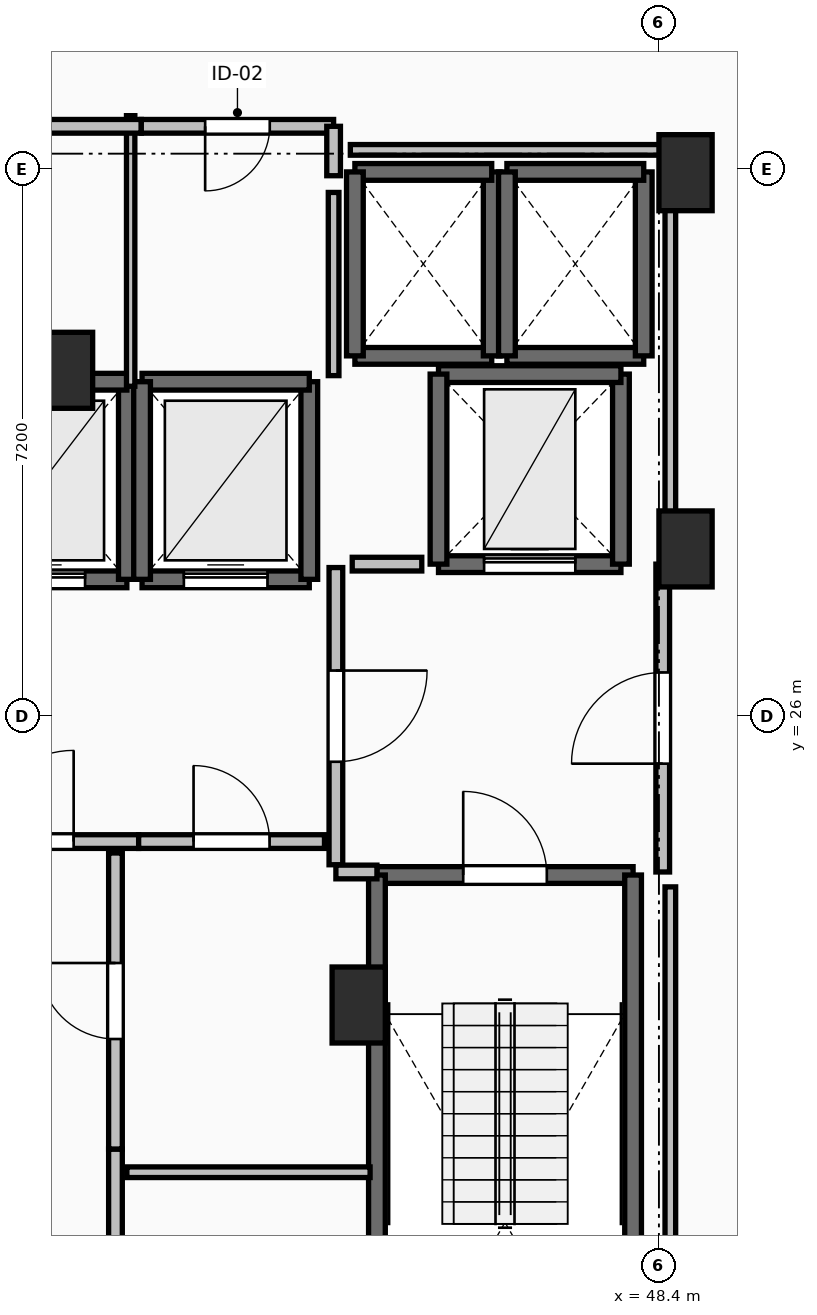
"""IFC4 building model, lengths in metres.
Left out: names, types, materials, properties, quantities, classifications, styles, units other than length and angle.
Written with IfcOpenShell. Run it as: python <this file> out.ifc"""

import sys

from ifc_helpers import new_model, si_unit, direction, frame, frame_2d, origin, origin_2d, place, context, subcontext, project, spatial, rectangle, extrude, element, fill, save


model = new_model("IFC4")
c1 = context("Model", 3, precision=1e-05, world=origin(), true_north=direction((0.0, 1.0)))
c2 = subcontext(c1, "Body", "Model", "MODEL_VIEW")
j1 = project(units=[si_unit("LENGTHUNIT", "METRE"), si_unit("PLANEANGLEUNIT", "RADIAN")], contexts=[c1])
p1 = place(None, origin())
s1 = spatial("IfcSite", under=j1, at=p1, CompositionType="ELEMENT")
p2 = place(p1, origin())
s2 = spatial("IfcBuilding", under=s1, at=p2, CompositionType="ELEMENT")
p3 = place(p2, frame((0.0, 0.0, 273.3)))
s3 = spatial("IfcBuildingStorey", under=s2, at=p3, CompositionType="ELEMENT", Elevation=273.3)
for number, where, z_axis, x_axis in (
    (1, (48.75, 33.15, 0.0), (0.0, 0.0, 1.0), (1.0, 0.0, 0.0)),
    (2, (48.75, 28.2, 0.0), (0.0, 0.0, 1.0), (1.0, 0.0, 0.0)),
    (3, (44.45, 22.2, 0.0), (0.0, 0.0, 1.0), (1.0, 0.0, 0.0)),
    (4, (40.6, 30.55, 0.0), (0.0, 0.0, 1.0), (1.0, 0.0, 0.0)),
):
    element("IfcColumn", number, at=place(p3, frame(where, z_axis=z_axis, x_axis=x_axis)), inside=s3, PredefinedType="PILASTER", context=c2, shape_type="SweptSolid", body=[
        extrude(rectangle(XDim=0.7, YDim=1.0, at=origin_2d()), origin(), (0.0, 0.0, 1.0), 3.55),
    ])
p4 = place(p3, frame((44.69, 23.91, 0.0), z_axis=(0.0, 0.0, 1.0), x_axis=(1.0, 0.0, 0.0)))
e5 = element("IfcWall", 5, at=p4, inside=s3, PredefinedType="SOLIDWALL", context=c2, shape_type="SweptSolid", body=[
    extrude(rectangle(XDim=3.37, YDim=0.22, at=frame_2d((1.685, 0.0))), origin(), (0.0, 0.0, 1.0), 3.29),
])
p5 = place(p4, frame((1.135, 0.0, 0.0)))
e6 = element("IfcOpeningElement", 6, at=p5, cuts=e5, PredefinedType="OPENING", context=c2, shape_type="SweptSolid", body=[
    extrude(rectangle(XDim=1.1, YDim=2.15, at=frame_2d((0.55, 1.075))), frame((0.0, 0.125, 0.0), z_axis=(0.0, -1.0, 0.0), x_axis=(1.0, 0.0, 0.0)), (0.0, 0.0, 1.0), 0.25),
])
for number, where, z_axis, x_axis in (
    (7, (48.06, 23.91, 0.0), (0.0, 0.0, 1.0), (0.0, -1.0, 0.0)),
    (8, (44.69, 16.49, 0.0), (0.0, 0.0, 1.0), (0.0, 1.0, 0.0)),
):
    element("IfcWall", number, at=place(p3, frame(where, z_axis=z_axis, x_axis=x_axis)), inside=s3, PredefinedType="SOLIDWALL", context=c2, shape_type="SweptSolid", body=[
        extrude(rectangle(XDim=7.42, YDim=0.22, at=frame_2d((3.71, 0.0))), origin(), (0.0, 0.0, 1.0), 3.29),
    ])
p6 = place(p3, frame((39.2, 27.8, 0.0), z_axis=(0.0, 0.0, 1.0), x_axis=(1.0, 0.0, 0.0)))
e9 = element("IfcWall", 9, at=p6, inside=s3, PredefinedType="SOLIDWALL", context=c2, shape_type="SweptSolid", body=[
    extrude(rectangle(XDim=2.2, YDim=0.22, at=frame_2d((1.1, 0.0))), origin(), (0.0, 0.0, 1.0), 3.29),
])
p7 = place(p6, frame((0.55, 0.0, 0.0)))
e10 = element("IfcOpeningElement", 10, at=p7, cuts=e9, PredefinedType="OPENING", context=c2, shape_type="SweptSolid", body=[
    extrude(rectangle(XDim=1.1, YDim=2.2, at=frame_2d((0.55, 1.1))), frame((0.0, 0.125, 0.0), z_axis=(0.0, -1.0, 0.0), x_axis=(1.0, 0.0, 0.0)), (0.0, 0.0, 1.0), 0.25),
])
p8 = place(p3, frame((41.4, 27.8, 0.0), z_axis=(0.0, 0.0, 1.0), x_axis=(0.0, 1.0, 0.0)))
e11 = element("IfcWall", 11, at=p8, inside=s3, PredefinedType="SOLIDWALL", context=c2, shape_type="SweptSolid", body=[
    extrude(rectangle(XDim=2.6, YDim=0.22, at=frame_2d((1.3, 0.0))), origin(), (0.0, 0.0, 1.0), 3.29),
])
p9 = place(p3, frame((41.4, 30.4, 0.0), z_axis=(0.0, 0.0, 1.0), x_axis=(-1.0, 0.0, 0.0)))
e12 = element("IfcWall", 12, at=p9, inside=s3, PredefinedType="SOLIDWALL", context=c2, shape_type="SweptSolid", body=[
    extrude(rectangle(XDim=2.2, YDim=0.22, at=frame_2d((1.1, 0.0))), origin(), (0.0, 0.0, 1.0), 3.29),
])
p10 = place(p3, frame((41.6, 27.8, 0.0), z_axis=(0.0, 0.0, 1.0), x_axis=(1.0, 0.0, 0.0)))
e13 = element("IfcWall", 13, at=p10, inside=s3, PredefinedType="SOLIDWALL", context=c2, shape_type="SweptSolid", body=[
    extrude(rectangle(XDim=2.2, YDim=0.22, at=frame_2d((1.1, 0.0))), origin(), (0.0, 0.0, 1.0), 3.29),
])
p11 = place(p10, frame((0.55, 0.0, 0.0)))
e14 = element("IfcOpeningElement", 14, at=p11, cuts=e13, PredefinedType="OPENING", context=c2, shape_type="SweptSolid", body=[
    extrude(rectangle(XDim=1.1, YDim=2.2, at=frame_2d((0.55, 1.1))), frame((0.0, 0.125, 0.0), z_axis=(0.0, -1.0, 0.0), x_axis=(1.0, 0.0, 0.0)), (0.0, 0.0, 1.0), 0.25),
])
p12 = place(p3, frame((43.8, 27.8, 0.0), z_axis=(0.0, 0.0, 1.0), x_axis=(0.0, 1.0, 0.0)))
e15 = element("IfcWall", 15, at=p12, inside=s3, PredefinedType="SOLIDWALL", context=c2, shape_type="SweptSolid", body=[
    extrude(rectangle(XDim=2.6, YDim=0.22, at=frame_2d((1.3, 0.0))), origin(), (0.0, 0.0, 1.0), 3.29),
])
p13 = place(p3, frame((43.8, 30.4, 0.0), z_axis=(0.0, 0.0, 1.0), x_axis=(-1.0, 0.0, 0.0)))
e16 = element("IfcWall", 16, at=p13, inside=s3, PredefinedType="SOLIDWALL", context=c2, shape_type="SweptSolid", body=[
    extrude(rectangle(XDim=2.2, YDim=0.22, at=frame_2d((1.1, 0.0))), origin(), (0.0, 0.0, 1.0), 3.29),
])
p14 = place(p3, frame((41.6, 30.4, 0.0), z_axis=(0.0, 0.0, 1.0), x_axis=(0.0, -1.0, 0.0)))
e17 = element("IfcWall", 17, at=p14, inside=s3, PredefinedType="SOLIDWALL", context=c2, shape_type="SweptSolid", body=[
    extrude(rectangle(XDim=2.6, YDim=0.22, at=frame_2d((1.3, 0.0))), origin(), (0.0, 0.0, 1.0), 3.29),
])
p15 = place(p3, frame((44.4, 30.74, 0.0), z_axis=(0.0, 0.0, 1.0), x_axis=(1.0, 0.0, 0.0)))
e18 = element("IfcWall", 18, at=p15, inside=s3, PredefinedType="SOLIDWALL", context=c2, shape_type="SweptSolid", body=[
    extrude(rectangle(XDim=1.8, YDim=0.22, at=frame_2d((0.9, 0.0))), origin(), (0.0, 0.0, 1.0), 3.29),
])
p16 = place(p3, frame((46.2, 30.74, 0.0), z_axis=(0.0, 0.0, 1.0), x_axis=(0.0, 1.0, 0.0)))
e19 = element("IfcWall", 19, at=p16, inside=s3, PredefinedType="SOLIDWALL", context=c2, shape_type="SweptSolid", body=[
    extrude(rectangle(XDim=2.42, YDim=0.22, at=frame_2d((1.21, 0.0))), origin(), (0.0, 0.0, 1.0), 3.29),
])
p17 = place(p3, frame((46.2, 33.16, 0.0), z_axis=(0.0, 0.0, 1.0), x_axis=(-1.0, 0.0, 0.0)))
e20 = element("IfcWall", 20, at=p17, inside=s3, PredefinedType="SOLIDWALL", context=c2, shape_type="SweptSolid", body=[
    extrude(rectangle(XDim=1.8, YDim=0.22, at=frame_2d((0.9, 0.0))), origin(), (0.0, 0.0, 1.0), 3.29),
])
p18 = place(p3, frame((44.4, 33.16, 0.0), z_axis=(0.0, 0.0, 1.0), x_axis=(0.0, -1.0, 0.0)))
e21 = element("IfcWall", 21, at=p18, inside=s3, PredefinedType="SOLIDWALL", context=c2, shape_type="SweptSolid", body=[
    extrude(rectangle(XDim=2.42, YDim=0.22, at=frame_2d((1.21, 0.0))), origin(), (0.0, 0.0, 1.0), 3.29),
])
p19 = place(p3, frame((46.4, 30.74, 0.0), z_axis=(0.0, 0.0, 1.0), x_axis=(1.0, 0.0, 0.0)))
e22 = element("IfcWall", 22, at=p19, inside=s3, PredefinedType="SOLIDWALL", context=c2, shape_type="SweptSolid", body=[
    extrude(rectangle(XDim=1.8, YDim=0.22, at=frame_2d((0.9, 0.0))), origin(), (0.0, 0.0, 1.0), 3.29),
])
p20 = place(p3, frame((48.2, 30.74, 0.0), z_axis=(0.0, 0.0, 1.0), x_axis=(0.0, 1.0, 0.0)))
e23 = element("IfcWall", 23, at=p20, inside=s3, PredefinedType="SOLIDWALL", context=c2, shape_type="SweptSolid", body=[
    extrude(rectangle(XDim=2.42, YDim=0.22, at=frame_2d((1.21, 0.0))), origin(), (0.0, 0.0, 1.0), 3.29),
])
p21 = place(p3, frame((48.2, 33.16, 0.0), z_axis=(0.0, 0.0, 1.0), x_axis=(-1.0, 0.0, 0.0)))
e24 = element("IfcWall", 24, at=p21, inside=s3, PredefinedType="SOLIDWALL", context=c2, shape_type="SweptSolid", body=[
    extrude(rectangle(XDim=1.8, YDim=0.22, at=frame_2d((0.9, 0.0))), origin(), (0.0, 0.0, 1.0), 3.29),
])
p22 = place(p3, frame((46.4, 33.16, 0.0), z_axis=(0.0, 0.0, 1.0), x_axis=(0.0, -1.0, 0.0)))
e25 = element("IfcWall", 25, at=p22, inside=s3, PredefinedType="SOLIDWALL", context=c2, shape_type="SweptSolid", body=[
    extrude(rectangle(XDim=2.42, YDim=0.22, at=frame_2d((1.21, 0.0))), origin(), (0.0, 0.0, 1.0), 3.29),
])
p23 = place(p3, frame((45.5, 28.0, 0.0), z_axis=(0.0, 0.0, 1.0), x_axis=(1.0, 0.0, 0.0)))
e26 = element("IfcWall", 26, at=p23, inside=s3, PredefinedType="SHEAR", context=c2, shape_type="SweptSolid", body=[
    extrude(rectangle(XDim=2.4, YDim=0.22, at=frame_2d((1.2, 0.0))), origin(), (0.0, 0.0, 1.0), 3.29),
])
p24 = place(p23, frame((0.6, 0.0, 0.0)))
e27 = element("IfcOpeningElement", 27, at=p24, cuts=e26, PredefinedType="OPENING", context=c2, shape_type="SweptSolid", body=[
    extrude(rectangle(XDim=1.2, YDim=2.2, at=frame_2d((0.6, 1.1))), frame((0.0, 0.125, 0.0), z_axis=(0.0, -1.0, 0.0), x_axis=(1.0, 0.0, 0.0)), (0.0, 0.0, 1.0), 0.25),
])
p25 = place(p3, frame((47.9, 28.0, 0.0), z_axis=(0.0, 0.0, 1.0), x_axis=(0.0, 1.0, 0.0)))
e28 = element("IfcWall", 28, at=p25, inside=s3, PredefinedType="SHEAR", context=c2, shape_type="SweptSolid", body=[
    extrude(rectangle(XDim=2.5, YDim=0.22, at=frame_2d((1.25, 0.0))), origin(), (0.0, 0.0, 1.0), 3.29),
])
p26 = place(p3, frame((47.9, 30.5, 0.0), z_axis=(0.0, 0.0, 1.0), x_axis=(-1.0, 0.0, 0.0)))
e29 = element("IfcWall", 29, at=p26, inside=s3, PredefinedType="SHEAR", context=c2, shape_type="SweptSolid", body=[
    extrude(rectangle(XDim=2.4, YDim=0.22, at=frame_2d((1.2, 0.0))), origin(), (0.0, 0.0, 1.0), 3.29),
])
p27 = place(p3, frame((45.5, 30.5, 0.0), z_axis=(0.0, 0.0, 1.0), x_axis=(0.0, -1.0, 0.0)))
e30 = element("IfcWall", 30, at=p27, inside=s3, PredefinedType="SHEAR", context=c2, shape_type="SweptSolid", body=[
    extrude(rectangle(XDim=2.5, YDim=0.22, at=frame_2d((1.25, 0.0))), origin(), (0.0, 0.0, 1.0), 3.29),
])
p28 = place(p3, frame((44.15, 27.955, 0.0), z_axis=(0.0, 0.0, 1.0), x_axis=(0.0, -1.0, 0.0)))
e31 = element("IfcWall", 31, at=p28, inside=s3, PredefinedType="PARTITIONING", context=c2, shape_type="SweptSolid", body=[
    extrude(rectangle(XDim=3.91, YDim=0.18, at=frame_2d((1.955, 0.0))), origin(), (0.0, 0.0, 1.0), 3.29),
])
p29 = place(p28, frame((1.355, 0.0, 0.0)))
e32 = element("IfcOpeningElement", 32, at=p29, cuts=e31, PredefinedType="OPENING", context=c2, shape_type="SweptSolid", body=[
    extrude(rectangle(XDim=1.2, YDim=2.15, at=frame_2d((0.6, 1.075))), frame((0.0, 0.105, 0.0), z_axis=(0.0, -1.0, 0.0), x_axis=(1.0, 0.0, 0.0)), (0.0, 0.0, 1.0), 0.21),
])
p30 = place(p3, frame((44.15, 23.95, 0.0), z_axis=(0.0, 0.0, 1.0), x_axis=(1.0, 0.0, 0.0)))
e33 = element("IfcWall", 33, at=p30, inside=s3, PredefinedType="PARTITIONING", context=c2, shape_type="SweptSolid", body=[
    extrude(rectangle(XDim=0.54, YDim=0.18, at=frame_2d((0.27, 0.0))), origin(), (0.0, 0.0, 1.0), 3.29),
])
p31 = place(p3, frame((48.45, 23.95, 0.0), z_axis=(0.0, 0.0, 1.0), x_axis=(0.0, 1.0, 0.0)))
e34 = element("IfcWall", 34, at=p31, inside=s3, PredefinedType="PARTITIONING", context=c2, shape_type="SweptSolid", body=[
    extrude(rectangle(XDim=4.05, YDim=0.18, at=frame_2d((2.025, 0.0))), origin(), (0.0, 0.0, 1.0), 3.29),
])
p32 = place(p31, frame((1.425, 0.0, 0.0)))
e35 = element("IfcOpeningElement", 35, at=p32, cuts=e34, PredefinedType="OPENING", context=c2, shape_type="SweptSolid", body=[
    extrude(rectangle(XDim=1.2, YDim=2.15, at=frame_2d((0.6, 1.075))), frame((0.0, 0.105, 0.0), z_axis=(0.0, -1.0, 0.0), x_axis=(1.0, 0.0, 0.0)), (0.0, 0.0, 1.0), 0.21),
])
p33 = place(p3, frame((38.645, 24.35, 0.0), z_axis=(0.0, 0.0, 1.0), x_axis=(1.0, 0.0, 0.0)))
e36 = element("IfcWall", 36, at=p33, inside=s3, PredefinedType="PARTITIONING", context=c2, shape_type="SweptSolid", body=[
    extrude(rectangle(XDim=2.91, YDim=0.18, at=frame_2d((1.455, 0.0))), origin(), (0.0, 0.0, 1.0), 3.29),
])
p34 = place(p33, frame((0.855, 0.0, 0.0)))
e37 = element("IfcOpeningElement", 37, at=p34, cuts=e36, PredefinedType="OPENING", context=c2, shape_type="SweptSolid", body=[
    extrude(rectangle(XDim=1.2, YDim=2.15, at=frame_2d((0.6, 1.075))), frame((0.0, 0.105, 0.0), z_axis=(0.0, -1.0, 0.0), x_axis=(1.0, 0.0, 0.0)), (0.0, 0.0, 1.0), 0.21),
])
p35 = place(p3, frame((41.555, 24.35, 0.0), z_axis=(0.0, 0.0, 1.0), x_axis=(1.0, 0.0, 0.0)))
e38 = element("IfcWall", 38, at=p35, inside=s3, PredefinedType="PARTITIONING", context=c2, shape_type="SweptSolid", body=[
    extrude(rectangle(XDim=2.445, YDim=0.18, at=frame_2d((1.223, 0.0))), origin(), (0.0, 0.0, 1.0), 3.29),
])
p36 = place(p35, frame((0.722, 0.0, 0.0)))
e39 = element("IfcOpeningElement", 39, at=p36, cuts=e38, PredefinedType="OPENING", context=c2, shape_type="SweptSolid", body=[
    extrude(rectangle(XDim=1.0, YDim=2.15, at=frame_2d((0.5, 1.075))), frame((0.0, 0.105, 0.0), z_axis=(0.0, -1.0, 0.0), x_axis=(1.0, 0.0, 0.0)), (0.0, 0.0, 1.0), 0.21),
])
p37 = place(p3, frame((41.25, 16.32, 0.0), z_axis=(0.0, 0.0, 1.0), x_axis=(0.0, 1.0, 0.0)))
e40 = element("IfcWall", 40, at=p37, inside=s3, PredefinedType="PARTITIONING", context=c2, shape_type="SweptSolid", body=[
    extrude(rectangle(XDim=3.985, YDim=0.18, at=frame_2d((1.992, 0.0))), origin(), (0.0, 0.0, 1.0), 3.29),
])
p38 = place(p37, frame((1.593, 0.0, 0.0)))
e41 = element("IfcOpeningElement", 41, at=p38, cuts=e40, PredefinedType="OPENING", context=c2, shape_type="SweptSolid", body=[
    extrude(rectangle(XDim=0.8, YDim=2.05, at=frame_2d((0.4, 1.025))), frame((0.0, 0.105, 0.0), z_axis=(0.0, -1.0, 0.0), x_axis=(1.0, 0.0, 0.0)), (0.0, 0.0, 1.0), 0.21),
])
p39 = place(p3, frame((41.25, 20.305, 0.0), z_axis=(0.0, 0.0, 1.0), x_axis=(0.0, 1.0, 0.0)))
e42 = element("IfcWall", 42, at=p39, inside=s3, PredefinedType="PARTITIONING", context=c2, shape_type="SweptSolid", body=[
    extrude(rectangle(XDim=3.895, YDim=0.18, at=frame_2d((1.948, 0.0))), origin(), (0.0, 0.0, 1.0), 2.482),
])
p40 = place(p39, frame((1.448, 0.0, 0.0)))
e43 = element("IfcOpeningElement", 43, at=p40, cuts=e42, PredefinedType="OPENING", context=c2, shape_type="SweptSolid", body=[
    extrude(rectangle(XDim=1.0, YDim=2.15, at=frame_2d((0.5, 1.075))), frame((0.0, 0.105, 0.0), z_axis=(0.0, -1.0, 0.0), x_axis=(1.0, 0.0, 0.0)), (0.0, 0.0, 1.0), 0.21),
])
p41 = place(p3, frame((44.6, 20.0, 0.0), z_axis=(0.0, 0.0, 1.0), x_axis=(-1.0, 0.0, 0.0)))
e44 = element("IfcWall", 44, at=p41, inside=s3, PredefinedType="PARTITIONING", context=c2, shape_type="SweptSolid", body=[
    extrude(rectangle(XDim=3.2, YDim=0.14, at=frame_2d((1.6, 0.0))), origin(), (0.0, 0.0, 1.0), 3.29),
])
p42 = place(p3, frame((41.45, 30.34, 0.0), z_axis=(0.0, 0.0, 1.0), x_axis=(0.0, 1.0, 0.0)))
e45 = element("IfcWall", 45, at=p42, inside=s3, PredefinedType="PARTITIONING", context=c2, shape_type="SweptSolid", body=[
    extrude(rectangle(XDim=3.56, YDim=0.11, at=frame_2d((1.78, 0.0))), origin(), (0.0, 0.0, 1.0), 3.29),
])
p43 = place(p3, frame((41.59, 33.76, 0.0), z_axis=(0.0, 0.0, 1.0), x_axis=(-1.0, 0.0, 0.0)))
e46 = element("IfcWall", 46, at=p43, inside=s3, PredefinedType="PARTITIONING", context=c2, shape_type="SweptSolid", body=[
    extrude(rectangle(XDim=3.44, YDim=0.18, at=frame_2d((1.72, 0.0))), origin(), (0.0, 0.0, 1.0), 3.29),
])
p44 = place(p43, frame((1.295, 0.0, 0.0)))
e47 = element("IfcOpeningElement", 47, at=p44, cuts=e46, PredefinedType="OPENING", context=c2, shape_type="SweptSolid", body=[
    extrude(rectangle(XDim=0.85, YDim=2.1, at=frame_2d((0.425, 1.05))), frame((0.0, 0.105, 0.0), z_axis=(0.0, -1.0, 0.0), x_axis=(1.0, 0.0, 0.0)), (0.0, 0.0, 1.0), 0.21),
])
p45 = place(p3, frame((44.12, 33.76, 0.0), z_axis=(0.0, 0.0, 1.0), x_axis=(-1.0, 0.0, 0.0)))
e48 = element("IfcWall", 48, at=p45, inside=s3, PredefinedType="PARTITIONING", context=c2, shape_type="SweptSolid", body=[
    extrude(rectangle(XDim=2.53, YDim=0.18, at=frame_2d((1.265, 0.0))), origin(), (0.0, 0.0, 1.0), 3.29),
])
p46 = place(p45, frame((0.84, 0.0, 0.0)))
e49 = element("IfcOpeningElement", 49, at=p46, cuts=e48, PredefinedType="OPENING", context=c2, shape_type="SweptSolid", body=[
    extrude(rectangle(XDim=0.85, YDim=2.1, at=frame_2d((0.425, 1.05))), frame((0.0, 0.105, 0.0), z_axis=(0.0, -1.0, 0.0), x_axis=(1.0, 0.0, 0.0)), (0.0, 0.0, 1.0), 0.21),
])
p47 = place(p3, frame((44.12, 33.11, 0.0), z_axis=(0.0, 0.0, 1.0), x_axis=(0.0, 1.0, 0.0)))
e50 = element("IfcWall", 50, at=p47, inside=s3, PredefinedType="PARTITIONING", context=c2, shape_type="SweptSolid", body=[
    extrude(rectangle(XDim=0.65, YDim=0.18, at=frame_2d((0.325, 0.0))), origin(), (0.0, 0.0, 1.0), 3.29),
])
p48 = place(p3, frame((45.28, 28.0, 0.0), z_axis=(0.0, 0.0, 1.0), x_axis=(-1.0, 0.0, 0.0)))
e51 = element("IfcWall", 51, at=p48, inside=s3, PredefinedType="PARTITIONING", context=c2, shape_type="SweptSolid", body=[
    extrude(rectangle(XDim=0.915, YDim=0.18, at=frame_2d((0.458, 0.0))), origin(), (0.0, 0.0, 1.0), 3.29),
])
p49 = place(p3, frame((44.12, 30.48, 0.0), z_axis=(0.0, 0.0, 1.0), x_axis=(0.0, 1.0, 0.0)))
e52 = element("IfcWall", 52, at=p49, inside=s3, PredefinedType="PARTITIONING", context=c2, shape_type="SweptSolid", body=[
    extrude(rectangle(XDim=2.41, YDim=0.14, at=frame_2d((1.205, 0.0))), origin(), (0.0, 0.0, 1.0), 3.29),
])
p50 = place(p3, frame((48.55, 16.24, 0.0), z_axis=(0.0, 0.0, 1.0), x_axis=(0.0, 1.0, 0.0)))
e53 = element("IfcWall", 53, at=p50, inside=s3, PredefinedType="PARTITIONING", context=c2, shape_type="SweptSolid", body=[
    extrude(rectangle(XDim=7.514, YDim=0.14, at=frame_2d((3.757, 0.0))), origin(), (0.0, 0.0, 1.0), 2.482),
])
p51 = place(p3, frame((48.55, 28.196, 0.0), z_axis=(0.0, 0.0, 1.0), x_axis=(0.0, 1.0, 0.0)))
e54 = element("IfcWall", 54, at=p51, inside=s3, PredefinedType="PARTITIONING", context=c2, shape_type="SweptSolid", body=[
    extrude(rectangle(XDim=5.254, YDim=0.14, at=frame_2d((2.627, 0.0))), origin(), (0.0, 0.0, 1.0), 2.482),
])
p52 = place(p3, frame((48.55, 33.45, 0.0), z_axis=(0.0, 0.0, 1.0), x_axis=(-1.0, 0.0, 0.0)))
e55 = element("IfcWall", 55, at=p52, inside=s3, PredefinedType="PARTITIONING", context=c2, shape_type="SweptSolid", body=[
    extrude(rectangle(XDim=4.21, YDim=0.14, at=frame_2d((2.105, 0.0))), origin(), (0.0, 0.0, 1.0), 2.482),
])
p53 = place(p5, origin())
e56 = element("IfcDoor", 56, at=p53, inside=s3, OperationType="SINGLE_SWING_LEFT", PredefinedType="DOOR", context=c2, shape_type="SweptSolid", body=[
    extrude(rectangle(XDim=1.1, YDim=2.15, at=frame_2d((0.55, 1.075))), frame((0.0, 0.025, 0.0), z_axis=(0.0, -1.0, 0.0), x_axis=(1.0, 0.0, 0.0)), (0.0, 0.0, 1.0), 0.05),
])
fill(e6, e56)
p54 = place(p7, origin())
e57 = element("IfcDoor", 57, at=p54, inside=s3, OperationType="SLIDING_TO_LEFT", PredefinedType="DOOR", context=c2, shape_type="SweptSolid", body=[
    extrude(rectangle(XDim=1.1, YDim=2.2, at=frame_2d((0.55, 1.1))), frame((0.0, 0.025, 0.0), z_axis=(0.0, -1.0, 0.0), x_axis=(1.0, 0.0, 0.0)), (0.0, 0.0, 1.0), 0.05),
])
fill(e10, e57)
p55 = place(p11, origin())
e58 = element("IfcDoor", 58, at=p55, inside=s3, OperationType="SLIDING_TO_LEFT", PredefinedType="DOOR", context=c2, shape_type="SweptSolid", body=[
    extrude(rectangle(XDim=1.1, YDim=2.2, at=frame_2d((0.55, 1.1))), frame((0.0, 0.025, 0.0), z_axis=(0.0, -1.0, 0.0), x_axis=(1.0, 0.0, 0.0)), (0.0, 0.0, 1.0), 0.05),
])
fill(e14, e58)
p56 = place(p24, origin())
e59 = element("IfcDoor", 59, at=p56, inside=s3, OperationType="SLIDING_TO_LEFT", PredefinedType="DOOR", context=c2, shape_type="SweptSolid", body=[
    extrude(rectangle(XDim=1.2, YDim=2.2, at=frame_2d((0.6, 1.1))), frame((0.0, 0.025, 0.0), z_axis=(0.0, -1.0, 0.0), x_axis=(1.0, 0.0, 0.0)), (0.0, 0.0, 1.0), 0.05),
])
fill(e27, e59)
p57 = place(p29, origin())
e60 = element("IfcDoor", 60, at=p57, inside=s3, OperationType="SINGLE_SWING_LEFT", PredefinedType="DOOR", context=c2, shape_type="SweptSolid", body=[
    extrude(rectangle(XDim=1.2, YDim=2.15, at=frame_2d((0.6, 1.075))), frame((0.0, 0.025, 0.0), z_axis=(0.0, -1.0, 0.0), x_axis=(1.0, 0.0, 0.0)), (0.0, 0.0, 1.0), 0.05),
])
fill(e32, e60)
p58 = place(p32, origin())
e61 = element("IfcDoor", 61, at=p58, inside=s3, OperationType="SINGLE_SWING_LEFT", PredefinedType="DOOR", context=c2, shape_type="SweptSolid", body=[
    extrude(rectangle(XDim=1.2, YDim=2.15, at=frame_2d((0.6, 1.075))), frame((0.0, 0.025, 0.0), z_axis=(0.0, -1.0, 0.0), x_axis=(1.0, 0.0, 0.0)), (0.0, 0.0, 1.0), 0.05),
])
fill(e35, e61)
p59 = place(p34, origin())
e62 = element("IfcDoor", 62, at=p59, inside=s3, OperationType="SINGLE_SWING_RIGHT", PredefinedType="DOOR", context=c2, shape_type="SweptSolid", body=[
    extrude(rectangle(XDim=1.2, YDim=2.15, at=frame_2d((0.6, 1.075))), frame((0.0, 0.025, 0.0), z_axis=(0.0, -1.0, 0.0), x_axis=(1.0, 0.0, 0.0)), (0.0, 0.0, 1.0), 0.05),
])
fill(e37, e62)
p60 = place(p36, origin())
e63 = element("IfcDoor", 63, at=p60, inside=s3, OperationType="SINGLE_SWING_LEFT", PredefinedType="DOOR", context=c2, shape_type="SweptSolid", body=[
    extrude(rectangle(XDim=1.0, YDim=2.15, at=frame_2d((0.5, 1.075))), frame((0.0, 0.025, 0.0), z_axis=(0.0, -1.0, 0.0), x_axis=(1.0, 0.0, 0.0)), (0.0, 0.0, 1.0), 0.05),
])
fill(e39, e63)
p61 = place(p40, origin())
e64 = element("IfcDoor", 64, at=p61, inside=s3, OperationType="SINGLE_SWING_RIGHT", PredefinedType="DOOR", context=c2, shape_type="SweptSolid", body=[
    extrude(rectangle(XDim=1.0, YDim=2.15, at=frame_2d((0.5, 1.075))), frame((0.0, 0.025, 0.0), z_axis=(0.0, -1.0, 0.0), x_axis=(1.0, 0.0, 0.0)), (0.0, 0.0, 1.0), 0.05),
])
fill(e43, e64)
p62 = place(p46, origin())
e65 = element("IfcDoor", 65, at=p62, inside=s3, OperationType="SINGLE_SWING_RIGHT", PredefinedType="DOOR", context=c2, shape_type="SweptSolid", body=[
    extrude(rectangle(XDim=0.85, YDim=2.1, at=frame_2d((0.425, 1.05))), frame((0.0, 0.025, 0.0), z_axis=(0.0, -1.0, 0.0), x_axis=(1.0, 0.0, 0.0)), (0.0, 0.0, 1.0), 0.05),
])
fill(e49, e65)
save(model, sys.argv[1])
